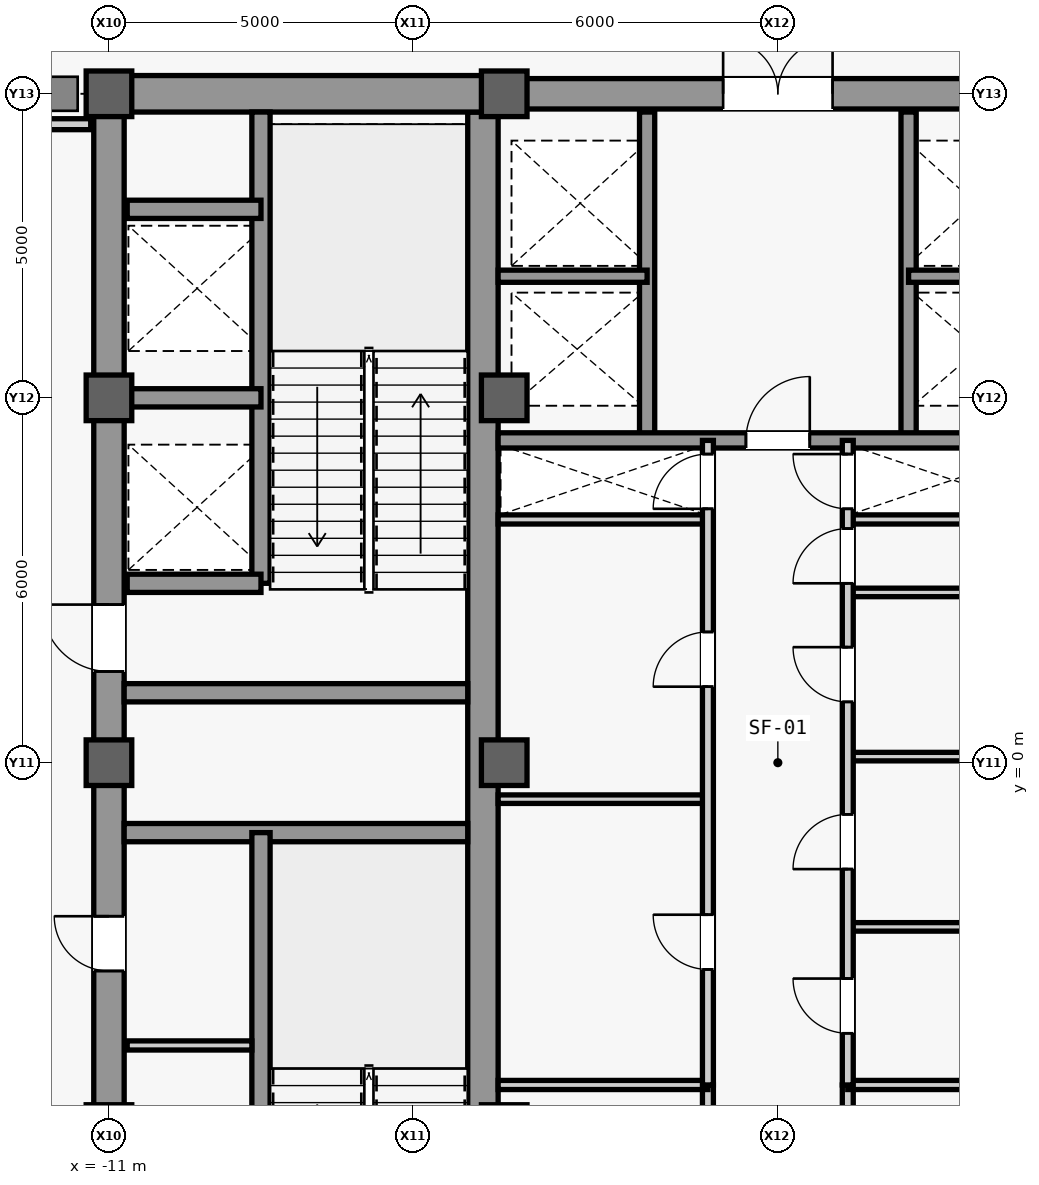
"""IFC4 building model, lengths in metres.
Left out: names, types, materials, properties, quantities, classifications, styles, units other than length and angle.
Written with IfcOpenShell. Run it as: python <this file> out.ifc"""

import sys

from ifc_helpers import new_model, si_unit, direction, frame, frame_2d, origin, origin_2d, place, context, subcontext, project, spatial, rectangle, extrude, source, transform, mapped, element, fill, save


model = new_model("IFC4")
c1 = context("Model", 3, precision=1e-05, world=origin(), true_north=direction((0.0, 1.0)))
c2 = subcontext(c1, "Body", "Model", "MODEL_VIEW")
j1 = project(units=[si_unit("LENGTHUNIT", "METRE"), si_unit("PLANEANGLEUNIT", "RADIAN")], contexts=[c1])
p1 = place(None, origin())
s1 = spatial("IfcSite", under=j1, at=p1, CompositionType="ELEMENT")
p2 = place(p1, origin())
s2 = spatial("IfcBuilding", under=s1, at=p2, CompositionType="ELEMENT")
p3 = place(p2, frame((0.0, 0.0, 268.3)))
s3 = spatial("IfcBuildingStorey", under=s2, at=p3, CompositionType="ELEMENT", Elevation=268.3)
m1 = source(origin(), c2, "Body", "SweptSolid", [
    extrude(rectangle(XDim=22.0, YDim=0.5, at=frame_2d((11.0, 0.0))), origin(), (0.0, 0.0, 1.0), 4.98),
])
p4 = place(p3, frame((-11.0, -11.0, 0.0), z_axis=(0.0, 0.0, 1.0), x_axis=(0.0, 1.0, 0.0)))
e1 = element("IfcWall", 1, at=p4, inside=s3, PredefinedType="SHEAR", context=c2, shape_type="MappedRepresentation", body=[
    mapped(m1, transform((0.0, 0.0, 0.0), scale=1.0)),
])
m2 = source(origin(), c2, "Body", "SweptSolid", [
    extrude(rectangle(XDim=1.1, YDim=2.2, at=frame_2d((0.55, 1.1))), frame((0.0, 0.26, 0.0), z_axis=(0.0, -1.0, 0.0), x_axis=(1.0, 0.0, 0.0)), (0.0, 0.0, 1.0), 0.52),
])
p5 = place(p4, frame((0.8, 0.0, 0.0)))
e2 = element("IfcOpeningElement", 2, at=p5, cuts=e1, PredefinedType="OPENING", context=c2, shape_type="MappedRepresentation", body=[
    mapped(m2, transform((0.0, 0.0, 0.0), scale=1.0)),
])
p6 = place(p4, frame((12.5, 0.0, 0.0)))
e3 = element("IfcOpeningElement", 3, at=p6, cuts=e1, PredefinedType="OPENING", context=c2, shape_type="MappedRepresentation", body=[
    mapped(m2, transform((0.0, 0.0, 0.0), scale=1.0)),
])
m3 = source(origin(), c2, "Body", "SweptSolid", [
    extrude(rectangle(XDim=0.9, YDim=2.15, at=frame_2d((0.45, 1.075))), frame((0.0, 0.26, 0.0), z_axis=(0.0, -1.0, 0.0), x_axis=(1.0, 0.0, 0.0)), (0.0, 0.0, 1.0), 0.52),
])
p7 = place(p4, frame((7.575, 0.0, 0.0)))
e4 = element("IfcOpeningElement", 4, at=p7, cuts=e1, PredefinedType="OPENING", context=c2, shape_type="MappedRepresentation", body=[
    mapped(m3, transform((0.0, 0.0, 0.0), scale=1.0)),
])
m4 = source(origin(), c2, "Body", "SweptSolid", [
    extrude(rectangle(XDim=1.3, YDim=2.3, at=frame_2d((0.65, 1.15))), frame((0.0, 0.26, 0.0), z_axis=(0.0, -1.0, 0.0), x_axis=(1.0, 0.0, 0.0)), (0.0, 0.0, 1.0), 0.52),
])
p8 = place(p4, frame((2.7, 0.0, 0.0)))
e5 = element("IfcOpeningElement", 5, at=p8, cuts=e1, PredefinedType="OPENING", context=c2, shape_type="MappedRepresentation", body=[
    mapped(m4, transform((0.0, 0.0, 0.0), scale=1.0)),
])
m5 = source(origin(), c2, "Body", "SweptSolid", [
    extrude(rectangle(XDim=21.4, YDim=0.5, at=frame_2d((10.7, 0.0))), origin(), (0.0, 0.0, 1.0), 4.98),
])
p9 = place(p3, frame((-4.85, -10.7, 0.0), z_axis=(0.0, 0.0, 1.0), x_axis=(0.0, 1.0, 0.0)))
e6 = element("IfcWall", 6, at=p9, inside=s3, PredefinedType="SHEAR", context=c2, shape_type="MappedRepresentation", body=[
    mapped(m5, transform((0.0, 0.0, 0.0), scale=1.0)),
])
m6 = source(origin(), c2, "Body", "SweptSolid", [
    extrude(rectangle(XDim=5.9, YDim=0.6, at=frame_2d((2.95, 0.0))), origin(), (0.0, 0.0, 1.0), 4.98),
])
p10 = place(p3, frame((-10.75, 11.0, 0.0), z_axis=(0.0, 0.0, 1.0), x_axis=(1.0, 0.0, 0.0)))
e7 = element("IfcWall", 7, at=p10, inside=s3, PredefinedType="SHEAR", context=c2, shape_type="MappedRepresentation", body=[
    mapped(m6, transform((0.0, 0.0, 0.0), scale=1.0)),
])
m7 = source(origin(), c2, "Body", "SweptSolid", [
    extrude(rectangle(XDim=5.65, YDim=0.3, at=frame_2d((2.825, 0.0))), origin(), (0.0, 0.0, 1.0), 4.98),
])
for number, where, z_axis, x_axis in (
    (8, (-10.75, -1.15, 0.0), (0.0, 0.0, 1.0), (1.0, 0.0, 0.0)),
    (9, (-10.75, 1.15, 0.0), (0.0, 0.0, 1.0), (1.0, 0.0, 0.0)),
):
    element("IfcWall", number, at=place(p3, frame(where, z_axis=z_axis, x_axis=x_axis)), inside=s3, PredefinedType="SHEAR", context=c2, shape_type="MappedRepresentation", body=[
        mapped(m7, transform((0.0, 0.0, 0.0), scale=1.0)),
    ])
m8 = source(origin(), c2, "Body", "SweptSolid", [
    extrude(rectangle(XDim=9.2, YDim=0.5, at=frame_2d((4.6, 0.0))), origin(), (0.0, 0.0, 1.0), 4.98),
])
p11 = place(p3, frame((-4.6, 11.0, 0.0), z_axis=(0.0, 0.0, 1.0), x_axis=(1.0, 0.0, 0.0)))
e10 = element("IfcWall", 10, at=p11, inside=s3, PredefinedType="SHEAR", context=c2, shape_type="MappedRepresentation", body=[
    mapped(m8, transform((0.0, 0.0, 0.0), scale=1.0)),
])
m9 = source(origin(), c2, "Body", "SweptSolid", [
    extrude(rectangle(XDim=1.8, YDim=2.25, at=frame_2d((0.9, 1.125))), frame((0.0, 0.26, 0.0), z_axis=(0.0, -1.0, 0.0), x_axis=(1.0, 0.0, 0.0)), (0.0, 0.0, 1.0), 0.52),
])
p12 = place(p11, frame((3.7, 0.0, 0.0)))
e11 = element("IfcOpeningElement", 11, at=p12, cuts=e10, PredefinedType="OPENING", context=c2, shape_type="MappedRepresentation", body=[
    mapped(m9, transform((0.0, 0.0, 0.0), scale=1.0)),
])
m10 = source(origin(), c2, "Body", "SweptSolid", [
    extrude(rectangle(XDim=0.75, YDim=0.75, at=origin_2d()), origin(), (0.0, 0.0, 1.0), 5.2),
])
for number, where, z_axis, x_axis in (
    (12, (-11.0, -6.0, 0.0), (0.0, 0.0, 1.0), (1.0, 0.0, 0.0)),
    (13, (-11.0, 0.0, 0.0), (0.0, 0.0, 1.0), (1.0, 0.0, 0.0)),
    (14, (-11.0, 6.0, 0.0), (0.0, 0.0, 1.0), (1.0, 0.0, 0.0)),
    (15, (-11.0, 11.0, 0.0), (0.0, 0.0, 1.0), (1.0, 0.0, 0.0)),
    (16, (-4.5, -6.0, 0.0), (0.0, 0.0, 1.0), (1.0, 0.0, 0.0)),
    (17, (-4.5, 0.0, 0.0), (0.0, 0.0, 1.0), (1.0, 0.0, 0.0)),
    (18, (-4.5, 6.0, 0.0), (0.0, 0.0, 1.0), (1.0, 0.0, 0.0)),
    (19, (-4.5, 11.0, 0.0), (0.0, 0.0, 1.0), (1.0, 0.0, 0.0)),
):
    element("IfcColumn", number, at=place(p3, frame(where, z_axis=z_axis, x_axis=x_axis)), inside=s3, PredefinedType="COLUMN", context=c2, shape_type="MappedRepresentation", body=[
        mapped(m10, transform((0.0, 0.0, 0.0), scale=1.0)),
    ])
m11 = source(origin(), c2, "Body", "SweptSolid", [
    extrude(rectangle(XDim=7.8, YDim=0.3, at=frame_2d((3.9, 0.0))), origin(), (0.0, 0.0, 1.0), 4.98),
])
p13 = place(p3, frame((-8.5, -8.95, 0.0), z_axis=(0.0, 0.0, 1.0), x_axis=(0.0, 1.0, 0.0)))
e20 = element("IfcWall", 20, at=p13, inside=s3, PredefinedType="SHEAR", context=c2, shape_type="MappedRepresentation", body=[
    mapped(m11, transform((0.0, 0.0, 0.0), scale=1.0)),
])
m12 = source(origin(), c2, "Body", "SweptSolid", [
    extrude(rectangle(XDim=7.75, YDim=0.3, at=frame_2d((3.875, 0.0))), origin(), (0.0, 0.0, 1.0), 4.98),
])
p14 = place(p3, frame((-8.5, 2.95, 0.0), z_axis=(0.0, 0.0, 1.0), x_axis=(0.0, 1.0, 0.0)))
e21 = element("IfcWall", 21, at=p14, inside=s3, PredefinedType="SHEAR", context=c2, shape_type="MappedRepresentation", body=[
    mapped(m12, transform((0.0, 0.0, 0.0), scale=1.0)),
])
m13 = source(origin(), c2, "Body", "SweptSolid", [
    extrude(rectangle(XDim=2.2, YDim=0.3, at=frame_2d((1.1, 0.0))), origin(), (0.0, 0.0, 1.0), 4.98),
])
for number, where, z_axis, x_axis in (
    (22, (-10.7, 2.95, 0.0), (0.0, 0.0, 1.0), (1.0, 0.0, 0.0)),
    (23, (-10.7, 6.0, 0.0), (0.0, 0.0, 1.0), (1.0, 0.0, 0.0)),
    (24, (-10.7, 9.1, 0.0), (0.0, 0.0, 1.0), (1.0, 0.0, 0.0)),
):
    element("IfcWall", number, at=place(p3, frame(where, z_axis=z_axis, x_axis=x_axis)), inside=s3, PredefinedType="SHEAR", context=c2, shape_type="MappedRepresentation", body=[
        mapped(m13, transform((0.0, 0.0, 0.0), scale=1.0)),
    ])
m14 = source(origin(), c2, "Body", "SweptSolid", [
    extrude(rectangle(XDim=2.05, YDim=0.15, at=frame_2d((1.025, 0.0))), origin(), (0.0, 0.0, 1.0), 4.98),
])
p15 = place(p3, frame((-10.7, -4.65, 0.0), z_axis=(0.0, 0.0, 1.0), x_axis=(1.0, 0.0, 0.0)))
e25 = element("IfcWall", 25, at=p15, inside=s3, PredefinedType="PARTITIONING", context=c2, shape_type="MappedRepresentation", body=[
    mapped(m14, transform((0.0, 0.0, 0.0), scale=1.0)),
])
m15 = source(origin(), c2, "Body", "SweptSolid", [
    extrude(rectangle(XDim=4.05, YDim=0.18, at=frame_2d((2.025, 0.0))), origin(), (0.0, 0.0, 1.0), 4.98),
])
p16 = place(p3, frame((-15.35, 10.5, 0.0), z_axis=(0.0, 0.0, 1.0), x_axis=(1.0, 0.0, 0.0)))
e26 = element("IfcWall", 26, at=p16, inside=s3, PredefinedType="PARTITIONING", context=c2, shape_type="MappedRepresentation", body=[
    mapped(m15, transform((0.0, 0.0, 0.0), scale=1.0)),
])
m16 = source(origin(), c2, "Body", "SweptSolid", [
    extrude(rectangle(XDim=3.45, YDim=0.15, at=frame_2d((1.725, 0.0))), origin(), (0.0, 0.0, 1.0), 4.98),
])
for number, where, z_axis, x_axis in (
    (27, (-4.6, 4.0, 0.0), (0.0, 0.0, 1.0), (1.0, 0.0, 0.0)),
    (28, (1.15, 4.0, 0.0), (0.0, 0.0, 1.0), (1.0, 0.0, 0.0)),
):
    element("IfcWall", number, at=place(p3, frame(where, z_axis=z_axis, x_axis=x_axis)), inside=s3, PredefinedType="PARTITIONING", context=c2, shape_type="MappedRepresentation", body=[
        mapped(m16, transform((0.0, 0.0, 0.0), scale=1.0)),
    ])
m17 = source(origin(), c2, "Body", "SweptSolid", [
    extrude(rectangle(XDim=5.4, YDim=0.18, at=frame_2d((2.7, 0.0))), origin(), (0.0, 0.0, 1.0), 4.98),
])
p17 = place(p3, frame((-1.15, -10.7, 0.0), z_axis=(0.0, 0.0, 1.0), x_axis=(0.0, 1.0, 0.0)))
e29 = element("IfcWall", 29, at=p17, inside=s3, PredefinedType="PARTITIONING", context=c2, shape_type="MappedRepresentation", body=[
    mapped(m17, transform((0.0, 0.0, 0.0), scale=1.0)),
])
m18 = source(origin(), c2, "Body", "SweptSolid", [
    extrude(rectangle(XDim=0.9, YDim=2.15, at=frame_2d((0.45, 1.075))), frame((0.0, 0.1, 0.0), z_axis=(0.0, -1.0, 0.0), x_axis=(1.0, 0.0, 0.0)), (0.0, 0.0, 1.0), 0.2),
])
p18 = place(p17, frame((1.15, 0.0, 0.0)))
e30 = element("IfcOpeningElement", 30, at=p18, cuts=e29, PredefinedType="OPENING", context=c2, shape_type="MappedRepresentation", body=[
    mapped(m18, transform((0.0, 0.0, 0.0), scale=1.0)),
])
p19 = place(p17, frame((3.85, 0.0, 0.0)))
e31 = element("IfcOpeningElement", 31, at=p19, cuts=e29, PredefinedType="OPENING", context=c2, shape_type="MappedRepresentation", body=[
    mapped(m18, transform((0.0, 0.0, 0.0), scale=1.0)),
])
p20 = place(p3, frame((1.15, -10.7, 0.0), z_axis=(0.0, 0.0, 1.0), x_axis=(0.0, 1.0, 0.0)))
e32 = element("IfcWall", 32, at=p20, inside=s3, PredefinedType="PARTITIONING", context=c2, shape_type="MappedRepresentation", body=[
    mapped(m17, transform((0.0, 0.0, 0.0), scale=1.0)),
])
p21 = place(p20, frame((2.25, 0.0, 0.0)))
e33 = element("IfcOpeningElement", 33, at=p21, cuts=e32, PredefinedType="OPENING", context=c2, shape_type="MappedRepresentation", body=[
    mapped(m18, transform((0.0, 0.0, 0.0), scale=1.0)),
])
for number, where, z_axis, x_axis in (
    (34, (-4.6, -5.3, 0.0), (0.0, 0.0, 1.0), (1.0, 0.0, 0.0)),
    (35, (1.15, -5.3, 0.0), (0.0, 0.0, 1.0), (1.0, 0.0, 0.0)),
):
    element("IfcWall", number, at=place(p3, frame(where, z_axis=z_axis, x_axis=x_axis)), inside=s3, PredefinedType="PARTITIONING", context=c2, shape_type="MappedRepresentation", body=[
        mapped(m16, transform((0.0, 0.0, 0.0), scale=1.0)),
    ])
m19 = source(origin(), c2, "Body", "SweptSolid", [
    extrude(rectangle(XDim=5.4, YDim=0.25, at=frame_2d((2.7, 0.0))), origin(), (0.0, 0.0, 1.0), 4.98),
])
for number, where, z_axis, x_axis in (
    (36, (-2.15, 5.3, 0.0), (0.0, 0.0, 1.0), (0.0, 1.0, 0.0)),
    (37, (2.15, 5.3, 0.0), (0.0, 0.0, 1.0), (0.0, 1.0, 0.0)),
):
    element("IfcWall", number, at=place(p3, frame(where, z_axis=z_axis, x_axis=x_axis)), inside=s3, PredefinedType="SHEAR", context=c2, shape_type="MappedRepresentation", body=[
        mapped(m19, transform((0.0, 0.0, 0.0), scale=1.0)),
    ])
m20 = source(origin(), c2, "Body", "SweptSolid", [
    extrude(rectangle(XDim=2.45, YDim=0.2, at=frame_2d((1.225, 0.0))), origin(), (0.0, 0.0, 1.0), 4.98),
])
for number, where, z_axis, x_axis in (
    (38, (-4.6, 8.0, 0.0), (0.0, 0.0, 1.0), (1.0, 0.0, 0.0)),
    (39, (2.15, 8.0, 0.0), (0.0, 0.0, 1.0), (1.0, 0.0, 0.0)),
):
    element("IfcWall", number, at=place(p3, frame(where, z_axis=z_axis, x_axis=x_axis)), inside=s3, PredefinedType="SHEAR", context=c2, shape_type="MappedRepresentation", body=[
        mapped(m20, transform((0.0, 0.0, 0.0), scale=1.0)),
    ])
m21 = source(origin(), c2, "Body", "SweptSolid", [
    extrude(rectangle(XDim=9.2, YDim=0.25, at=frame_2d((4.6, 0.0))), origin(), (0.0, 0.0, 1.0), 4.98),
])
p22 = place(p3, frame((-4.6, 5.3, 0.0), z_axis=(0.0, 0.0, 1.0), x_axis=(1.0, 0.0, 0.0)))
e40 = element("IfcWall", 40, at=p22, inside=s3, PredefinedType="SHEAR", context=c2, shape_type="MappedRepresentation", body=[
    mapped(m21, transform((0.0, 0.0, 0.0), scale=1.0)),
])
m22 = source(origin(), c2, "Body", "SweptSolid", [
    extrude(rectangle(XDim=1.05, YDim=2.2, at=frame_2d((0.525, 1.1))), frame((0.0, 0.135, 0.0), z_axis=(0.0, -1.0, 0.0), x_axis=(1.0, 0.0, 0.0)), (0.0, 0.0, 1.0), 0.27),
])
p23 = place(p22, frame((4.075, 0.0, 0.0)))
e41 = element("IfcOpeningElement", 41, at=p23, cuts=e40, PredefinedType="OPENING", context=c2, shape_type="MappedRepresentation", body=[
    mapped(m22, transform((0.0, 0.0, 0.0), scale=1.0)),
])
m23 = source(origin(), c2, "Body", "SweptSolid", [
    extrude(rectangle(XDim=3.45, YDim=0.14, at=frame_2d((1.725, 0.0))), origin(), (0.0, 0.0, 1.0), 4.98),
])
p24 = place(p3, frame((-4.6, -0.6, 0.0), z_axis=(0.0, 0.0, 1.0), x_axis=(1.0, 0.0, 0.0)))
e42 = element("IfcWall", 42, at=p24, inside=s3, PredefinedType="PARTITIONING", context=c2, shape_type="MappedRepresentation", body=[
    mapped(m23, transform((0.0, 0.0, 0.0), scale=1.0)),
])
m24 = source(origin(), c2, "Body", "SweptSolid", [
    extrude(rectangle(XDim=10.6, YDim=0.18, at=frame_2d((5.3, 0.0))), origin(), (0.0, 0.0, 1.0), 4.98),
])
p25 = place(p3, frame((-1.15, -5.3, 0.0), z_axis=(0.0, 0.0, 1.0), x_axis=(0.0, 1.0, 0.0)))
e43 = element("IfcWall", 43, at=p25, inside=s3, PredefinedType="PARTITIONING", context=c2, shape_type="MappedRepresentation", body=[
    mapped(m24, transform((0.0, 0.0, 0.0), scale=1.0)),
])
p26 = place(p25, frame((1.9, 0.0, 0.0)))
e44 = element("IfcOpeningElement", 44, at=p26, cuts=e43, PredefinedType="OPENING", context=c2, shape_type="MappedRepresentation", body=[
    mapped(m18, transform((0.0, 0.0, 0.0), scale=1.0)),
])
p27 = place(p25, frame((6.55, 0.0, 0.0)))
e45 = element("IfcOpeningElement", 45, at=p27, cuts=e43, PredefinedType="OPENING", context=c2, shape_type="MappedRepresentation", body=[
    mapped(m18, transform((0.0, 0.0, 0.0), scale=1.0)),
])
p28 = place(p25, frame((9.475, 0.0, 0.0)))
e46 = element("IfcOpeningElement", 46, at=p28, cuts=e43, PredefinedType="OPENING", context=c2, shape_type="MappedRepresentation", body=[
    mapped(m18, transform((0.0, 0.0, 0.0), scale=1.0)),
])
p29 = place(p3, frame((1.15, -2.7, 0.0), z_axis=(0.0, 0.0, 1.0), x_axis=(1.0, 0.0, 0.0)))
e47 = element("IfcWall", 47, at=p29, inside=s3, PredefinedType="PARTITIONING", context=c2, shape_type="MappedRepresentation", body=[
    mapped(m23, transform((0.0, 0.0, 0.0), scale=1.0)),
])
m25 = source(origin(), c2, "Body", "SweptSolid", [
    extrude(rectangle(XDim=3.45, YDim=0.14, at=frame_2d((1.725, 0.0))), origin(), (0.0, 0.0, 1.0), 4.285),
])
p30 = place(p3, frame((1.15, 0.1, 0.0), z_axis=(0.0, 0.0, 1.0), x_axis=(1.0, 0.0, 0.0)))
e48 = element("IfcWall", 48, at=p30, inside=s3, PredefinedType="PARTITIONING", context=c2, shape_type="MappedRepresentation", body=[
    mapped(m25, transform((0.0, 0.0, 0.0), scale=1.0)),
])
p31 = place(p3, frame((1.15, 2.8, 0.0), z_axis=(0.0, 0.0, 1.0), x_axis=(1.0, 0.0, 0.0)))
e49 = element("IfcWall", 49, at=p31, inside=s3, PredefinedType="PARTITIONING", context=c2, shape_type="MappedRepresentation", body=[
    mapped(m23, transform((0.0, 0.0, 0.0), scale=1.0)),
])
p32 = place(p3, frame((1.15, -5.3, 0.0), z_axis=(0.0, 0.0, 1.0), x_axis=(0.0, 1.0, 0.0)))
e50 = element("IfcWall", 50, at=p32, inside=s3, PredefinedType="PARTITIONING", context=c2, shape_type="MappedRepresentation", body=[
    mapped(m24, transform((0.0, 0.0, 0.0), scale=1.0)),
])
p33 = place(p32, frame((0.85, 0.0, 0.0)))
e51 = element("IfcOpeningElement", 51, at=p33, cuts=e50, PredefinedType="OPENING", context=c2, shape_type="MappedRepresentation", body=[
    mapped(m18, transform((0.0, 0.0, 0.0), scale=1.0)),
])
p34 = place(p32, frame((3.55, 0.0, 0.0)))
e52 = element("IfcOpeningElement", 52, at=p34, cuts=e50, PredefinedType="OPENING", context=c2, shape_type="MappedRepresentation", body=[
    mapped(m18, transform((0.0, 0.0, 0.0), scale=1.0)),
])
p35 = place(p32, frame((6.3, 0.0, 0.0)))
e53 = element("IfcOpeningElement", 53, at=p35, cuts=e50, PredefinedType="OPENING", context=c2, shape_type="MappedRepresentation", body=[
    mapped(m18, transform((0.0, 0.0, 0.0), scale=1.0)),
])
p36 = place(p32, frame((8.25, 0.0, 0.0)))
e54 = element("IfcOpeningElement", 54, at=p36, cuts=e50, PredefinedType="OPENING", context=c2, shape_type="MappedRepresentation", body=[
    mapped(m18, transform((0.0, 0.0, 0.0), scale=1.0)),
])
p37 = place(p32, frame((9.475, 0.0, 0.0)))
e55 = element("IfcOpeningElement", 55, at=p37, cuts=e50, PredefinedType="OPENING", context=c2, shape_type="MappedRepresentation", body=[
    mapped(m18, transform((0.0, 0.0, 0.0), scale=1.0)),
])
m26 = source(origin(), c2, "Body", "SweptSolid", [
    extrude(rectangle(XDim=1.1, YDim=2.2, at=frame_2d((0.55, 1.1))), frame((0.0, 0.025, 0.0), z_axis=(0.0, -1.0, 0.0), x_axis=(1.0, 0.0, 0.0)), (0.0, 0.0, 1.0), 0.05),
])
p38 = place(p6, origin())
e56 = element("IfcDoor", 56, at=p38, inside=s3, OperationType="SINGLE_SWING_RIGHT", PredefinedType="DOOR", context=c2, shape_type="MappedRepresentation", body=[
    mapped(m26, transform((0.0, 0.0, 0.0), scale=1.0)),
])
fill(e3, e56)
m27 = source(origin(), c2, "Body", "SweptSolid", [
    extrude(rectangle(XDim=0.9, YDim=2.15, at=frame_2d((0.45, 1.075))), frame((0.0, 0.025, 0.0), z_axis=(0.0, -1.0, 0.0), x_axis=(1.0, 0.0, 0.0)), (0.0, 0.0, 1.0), 0.05),
])
p39 = place(p7, origin())
e57 = element("IfcDoor", 57, at=p39, inside=s3, OperationType="SINGLE_SWING_RIGHT", PredefinedType="DOOR", context=c2, shape_type="MappedRepresentation", body=[
    mapped(m27, transform((0.0, 0.0, 0.0), scale=1.0)),
])
fill(e4, e57)
m28 = source(origin(), c2, "Body", "SweptSolid", [
    extrude(rectangle(XDim=1.05, YDim=2.2, at=frame_2d((0.525, 1.1))), frame((0.0, 0.025, 0.0), z_axis=(0.0, -1.0, 0.0), x_axis=(1.0, 0.0, 0.0)), (0.0, 0.0, 1.0), 0.05),
])
p40 = place(p23, origin())
e58 = element("IfcDoor", 58, at=p40, inside=s3, OperationType="SINGLE_SWING_RIGHT", PredefinedType="DOOR", context=c2, shape_type="MappedRepresentation", body=[
    mapped(m28, transform((0.0, 0.0, 0.0), scale=1.0)),
])
fill(e41, e58)
m29 = source(origin(), c2, "Body", "SweptSolid", [
    extrude(rectangle(XDim=1.8, YDim=2.25, at=frame_2d((0.9, 1.125))), frame((0.0, 0.025, 0.0), z_axis=(0.0, -1.0, 0.0), x_axis=(1.0, 0.0, 0.0)), (0.0, 0.0, 1.0), 0.05),
])
p41 = place(p12, origin())
e59 = element("IfcDoor", 59, at=p41, inside=s3, OperationType="SINGLE_SWING_RIGHT", PredefinedType="DOOR", context=c2, shape_type="MappedRepresentation", body=[
    mapped(m29, transform((0.0, 0.0, 0.0), scale=1.0)),
])
fill(e11, e59)
p42 = place(p26, origin())
e60 = element("IfcDoor", 60, at=p42, inside=s3, OperationType="SINGLE_SWING_RIGHT", PredefinedType="DOOR", context=c2, shape_type="MappedRepresentation", body=[
    mapped(m27, transform((0.0, 0.0, 0.0), scale=1.0)),
])
fill(e44, e60)
p43 = place(p27, origin())
e61 = element("IfcDoor", 61, at=p43, inside=s3, OperationType="SINGLE_SWING_LEFT", PredefinedType="DOOR", context=c2, shape_type="MappedRepresentation", body=[
    mapped(m27, transform((0.0, 0.0, 0.0), scale=1.0)),
])
fill(e45, e61)
p44 = place(p33, origin())
e62 = element("IfcDoor", 62, at=p44, inside=s3, OperationType="SINGLE_SWING_RIGHT", PredefinedType="DOOR", context=c2, shape_type="MappedRepresentation", body=[
    mapped(m27, transform((0.0, 0.0, 0.0), scale=1.0)),
])
fill(e51, e62)
p45 = place(p34, origin())
e63 = element("IfcDoor", 63, at=p45, inside=s3, OperationType="SINGLE_SWING_LEFT", PredefinedType="DOOR", context=c2, shape_type="MappedRepresentation", body=[
    mapped(m27, transform((0.0, 0.0, 0.0), scale=1.0)),
])
fill(e52, e63)
p46 = place(p35, origin())
e64 = element("IfcDoor", 64, at=p46, inside=s3, OperationType="SINGLE_SWING_RIGHT", PredefinedType="DOOR", context=c2, shape_type="MappedRepresentation", body=[
    mapped(m27, transform((0.0, 0.0, 0.0), scale=1.0)),
])
fill(e53, e64)
p47 = place(p36, origin())
e65 = element("IfcDoor", 65, at=p47, inside=s3, OperationType="SINGLE_SWING_LEFT", PredefinedType="DOOR", context=c2, shape_type="MappedRepresentation", body=[
    mapped(m27, transform((0.0, 0.0, 0.0), scale=1.0)),
])
fill(e54, e65)
p48 = place(p28, origin())
e66 = element("IfcDoor", 66, at=p48, inside=s3, OperationType="SINGLE_SWING_LEFT", PredefinedType="DOOR", context=c2, shape_type="MappedRepresentation", body=[
    mapped(m27, transform((0.0, 0.0, 0.0), scale=1.0)),
])
fill(e46, e66)
p49 = place(p37, origin())
e67 = element("IfcDoor", 67, at=p49, inside=s3, OperationType="SINGLE_SWING_RIGHT", PredefinedType="DOOR", context=c2, shape_type="MappedRepresentation", body=[
    mapped(m27, transform((0.0, 0.0, 0.0), scale=1.0)),
])
fill(e55, e67)
save(model, sys.argv[1])
